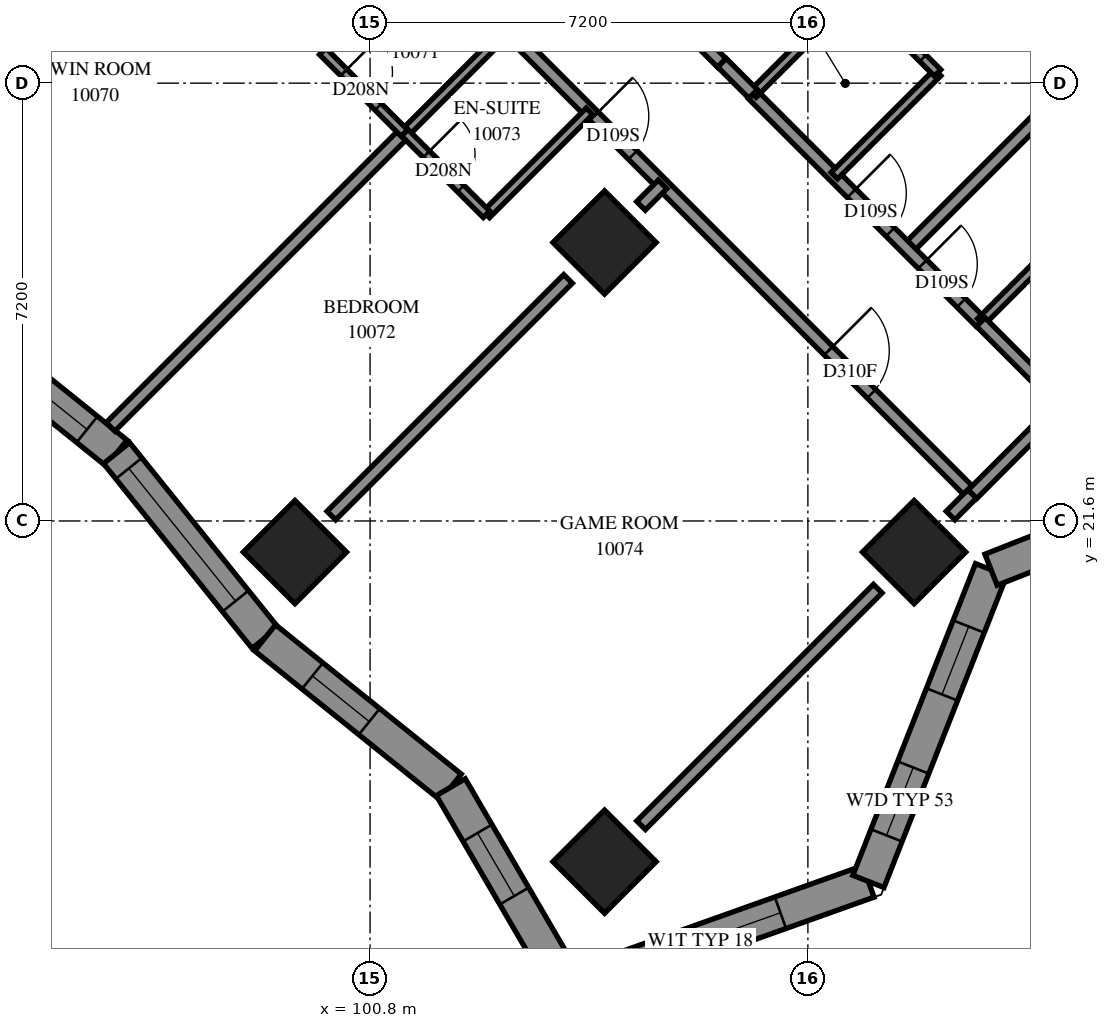
"""IFC4 building model, lengths in metres.
Left out: names, types, materials, properties, quantities, classifications, styles, units other than length and angle.
Written with IfcOpenShell. Run it as: python <this file> out.ifc"""

import sys

from ifc_helpers import new_model, si_unit, direction, frame, frame_2d, origin, origin_2d, place, context, subcontext, project, spatial, polyline, rectangle, outline, extrude, element, fill, save


model = new_model("IFC4")
c1 = context("Model", 3, precision=1e-05, world=origin(), true_north=direction((0.0, 1.0)))
c2 = subcontext(c1, "Body", "Model", "MODEL_VIEW")
j1 = project(units=[si_unit("LENGTHUNIT", "METRE"), si_unit("PLANEANGLEUNIT", "RADIAN")], contexts=[c1])
p1 = place(None, origin())
s1 = spatial("IfcSite", under=j1, at=p1, CompositionType="ELEMENT")
p2 = place(p1, origin())
s2 = spatial("IfcBuilding", under=s1, at=p2, CompositionType="ELEMENT")
p3 = place(p2, frame((0.0, 0.0, 40.6)))
s3 = spatial("IfcBuildingStorey", under=s2, at=p3, CompositionType="ELEMENT", Elevation=40.6)
for number, where, z_axis, x_axis in (
    (1, (104.656, 26.18, 0.0), (0.0, 0.0, 1.0), (0.707, -0.707, 0.0)),
    (2, (99.565, 21.088, 0.0), (0.0, 0.0, 1.0), (0.707, -0.707, 0.0)),
    (3, (109.747, 21.088, 0.0), (0.0, 0.0, 1.0), (0.707, -0.707, 0.0)),
    (4, (104.656, 15.997, 0.0), (0.0, 0.0, 1.0), (0.707, -0.707, 0.0)),
):
    element("IfcColumn", number, at=place(p3, frame(where, z_axis=z_axis, x_axis=x_axis)), inside=s3, PredefinedType="COLUMN", context=c2, shape_type="SweptSolid", body=[
        extrude(rectangle(XDim=1.2, YDim=1.2, at=origin_2d()), origin(), (0.0, 0.0, 1.0), 3.1),
    ])
p4 = place(p3, frame((104.056, 13.914, 0.0), z_axis=(0.0, 0.0, 1.0), x_axis=(0.942037149, 0.3355085839, 0.0)))
e5 = element("IfcWall", 5, at=p4, inside=s3, PredefinedType="SOLIDWALL", context=c2, shape_type="SweptSolid", body=[
    extrude(outline(polyline([(-0.228, -0.275), (5.368, -0.275), (5.118, 0.275), (0.228, 0.275), (-0.228, -0.275)])), origin(), (0.0, 0.0, 1.0), 3.1),
])
p5 = place(p4, frame((0.907, 0.0, 0.5)))
e6 = element("IfcOpeningElement", 6, at=p5, cuts=e5, PredefinedType="OPENING", context=c2, shape_type="SweptSolid", body=[
    extrude(rectangle(XDim=2.8, YDim=2.45, at=frame_2d((1.4, 1.225))), frame((0.0, 0.285, 0.0), z_axis=(0.0, -1.0, 0.0), x_axis=(1.0, 0.0, 0.0)), (0.0, 0.0, 1.0), 0.57),
])
p6 = place(p3, frame((108.995, 15.673, 0.0), z_axis=(0.0, 0.0, 1.0), x_axis=(0.3662073004, 0.930533295, 0.0)))
e7 = element("IfcWall", 7, at=p6, inside=s3, PredefinedType="SOLIDWALL", context=c2, shape_type="SweptSolid", body=[
    extrude(outline(polyline([(-0.125, -0.275), (5.388, -0.275), (5.628, 0.275), (0.125, 0.275), (-0.125, -0.275)])), origin(), (0.0, 0.0, 1.0), 3.1),
])
p7 = place(p6, frame((0.813, 0.0, 0.5)))
e8 = element("IfcOpeningElement", 8, at=p7, cuts=e7, PredefinedType="OPENING", context=c2, shape_type="SweptSolid", body=[
    extrude(rectangle(XDim=1.2, YDim=2.45, at=frame_2d((0.6, 1.225))), frame((0.0, 0.285, 0.0), z_axis=(0.0, -1.0, 0.0), x_axis=(1.0, 0.0, 0.0)), (0.0, 0.0, 1.0), 0.57),
])
p8 = place(p6, frame((3.304, 0.0, 0.5)))
e9 = element("IfcOpeningElement", 9, at=p8, cuts=e7, PredefinedType="OPENING", context=c2, shape_type="SweptSolid", body=[
    extrude(rectangle(XDim=1.2, YDim=2.45, at=frame_2d((0.6, 1.225))), frame((0.0, 0.285, 0.0), z_axis=(0.0, -1.0, 0.0), x_axis=(1.0, 0.0, 0.0)), (0.0, 0.0, 1.0), 0.57),
])
p9 = place(p3, frame((111.012, 20.798, 0.0), z_axis=(0.0, 0.0, 1.0), x_axis=(0.9305394819, 0.3661915791, 0.0)))
e10 = element("IfcWall", 10, at=p9, inside=s3, PredefinedType="SOLIDWALL", context=c2, shape_type="SweptSolid", body=[
    extrude(outline(polyline([(0.12, -0.275), (5.633, -0.275), (5.383, 0.275), (-0.12, 0.275), (0.12, -0.275)])), origin(), (0.0, 0.0, 1.0), 3.1),
])
p10 = place(p9, frame((1.166, 0.0, 0.5)))
e11 = element("IfcOpeningElement", 11, at=p10, cuts=e10, PredefinedType="OPENING", context=c2, shape_type="SweptSolid", body=[
    extrude(rectangle(XDim=2.8, YDim=2.45, at=frame_2d((1.4, 1.225))), frame((0.0, 0.285, 0.0), z_axis=(0.0, -1.0, 0.0), x_axis=(1.0, 0.0, 0.0)), (0.0, 0.0, 1.0), 0.57),
])
p11 = place(p3, frame((93.593, 25.158, 0.0), z_axis=(0.0, 0.0, 1.0), x_axis=(0.7793346456, -0.6266079397, 0.0)))
e12 = element("IfcWall", 12, at=p11, inside=s3, PredefinedType="SOLIDWALL", context=c2, shape_type="SweptSolid", body=[
    extrude(outline(polyline([(-0.03, -0.275), (3.868, -0.275), (3.928, 0.275), (0.03, 0.275), (-0.03, -0.275)])), origin(), (0.0, 0.0, 1.0), 3.1),
])
p12 = place(p11, frame((0.475, 0.0, 0.5)))
e13 = element("IfcOpeningElement", 13, at=p12, cuts=e12, PredefinedType="OPENING", context=c2, shape_type="SweptSolid", body=[
    extrude(rectangle(XDim=2.8, YDim=2.45, at=frame_2d((1.4, 1.225))), frame((0.0, 0.285, 0.0), z_axis=(0.0, -1.0, 0.0), x_axis=(1.0, 0.0, 0.0)), (0.0, 0.0, 1.0), 0.57),
])
p13 = place(p3, frame((96.631, 22.716, 0.0), z_axis=(0.0, 0.0, 1.0), x_axis=(0.6265954114, -0.7793447186, 0.0)))
e14 = element("IfcWall", 14, at=p13, inside=s3, PredefinedType="SOLIDWALL", context=c2, shape_type="SweptSolid", body=[
    extrude(outline(polyline([(0.03, -0.275), (3.928, -0.275), (3.868, 0.275), (-0.03, 0.275), (0.03, -0.275)])), origin(), (0.0, 0.0, 1.0), 3.1),
])
p14 = place(p13, frame((0.322, 0.0, 0.5)))
e15 = element("IfcOpeningElement", 15, at=p14, cuts=e14, PredefinedType="OPENING", context=c2, shape_type="SweptSolid", body=[
    extrude(rectangle(XDim=2.8, YDim=2.45, at=frame_2d((1.4, 1.225))), frame((0.0, 0.285, 0.0), z_axis=(0.0, -1.0, 0.0), x_axis=(1.0, 0.0, 0.0)), (0.0, 0.0, 1.0), 0.57),
])
p15 = place(p3, frame((99.073, 19.678, 0.0), z_axis=(0.0, 0.0, 1.0), x_axis=(0.7793429302, -0.6265976358, 0.0)))
e16 = element("IfcWall", 16, at=p15, inside=s3, PredefinedType="SOLIDWALL", context=c2, shape_type="SweptSolid", body=[
    extrude(outline(polyline([(-0.03, -0.275), (3.868, -0.275), (3.97, 0.275), (0.03, 0.275), (-0.03, -0.275)])), origin(), (0.0, 0.0, 1.0), 3.1),
])
p16 = place(p15, frame((0.999, 0.0, 0.5)))
e17 = element("IfcOpeningElement", 17, at=p16, cuts=e16, PredefinedType="OPENING", context=c2, shape_type="SweptSolid", body=[
    extrude(rectangle(XDim=1.2, YDim=2.45, at=frame_2d((0.6, 1.225))), frame((0.0, 0.285, 0.0), z_axis=(0.0, -1.0, 0.0), x_axis=(1.0, 0.0, 0.0)), (0.0, 0.0, 1.0), 0.57),
])
p17 = place(p3, frame((102.128, 17.223, 0.0), z_axis=(0.0, 0.0, 1.0), x_axis=(0.5036112548, -0.8639303815, 0.0)))
e18 = element("IfcWall", 18, at=p17, inside=s3, PredefinedType="SOLIDWALL", context=c2, shape_type="SweptSolid", body=[
    extrude(outline(polyline([(0.051, -0.275), (4.058, -0.275), (3.602, 0.275), (-0.051, 0.275), (0.051, -0.275)])), origin(), (0.0, 0.0, 1.0), 3.1),
])
p18 = place(p17, frame((0.872, 0.0, 0.5)))
e19 = element("IfcOpeningElement", 19, at=p18, cuts=e18, PredefinedType="OPENING", context=c2, shape_type="SweptSolid", body=[
    extrude(rectangle(XDim=1.2, YDim=2.45, at=frame_2d((0.6, 1.225))), frame((0.0, 0.285, 0.0), z_axis=(0.0, -1.0, 0.0), x_axis=(1.0, 0.0, 0.0)), (0.0, 0.0, 1.0), 0.57),
])
p19 = place(p3, frame((103.061, 29.677, 0.0), z_axis=(0.0, 0.0, 1.0), x_axis=(0.7071067812, -0.7071067812, 0.0)))
e20 = element("IfcWall", 20, at=p19, inside=s3, PredefinedType="PARTITIONING", context=c2, shape_type="SweptSolid", body=[
    extrude(rectangle(XDim=10.802, YDim=0.2, at=frame_2d((5.401, 0.0))), origin(), (0.0, 0.0, 1.0), 3.1),
])
p20 = place(p19, frame((2.012, 0.0, 0.0)))
e21 = element("IfcOpeningElement", 21, at=p20, cuts=e20, PredefinedType="OPENING", context=c2, shape_type="SweptSolid", body=[
    extrude(rectangle(XDim=0.9, YDim=2.1, at=frame_2d((0.45, 1.05))), frame((0.0, 0.11, 0.0), z_axis=(0.0, -1.0, 0.0), x_axis=(1.0, 0.0, 0.0)), (0.0, 0.0, 1.0), 0.22),
])
p21 = place(p19, frame((7.463, 0.0, 0.0)))
e22 = element("IfcOpeningElement", 22, at=p21, cuts=e20, PredefinedType="OPENING", context=c2, shape_type="SweptSolid", body=[
    extrude(rectangle(XDim=1.0, YDim=2.1, at=frame_2d((0.5, 1.05))), frame((0.0, 0.11, 0.0), z_axis=(0.0, -1.0, 0.0), x_axis=(1.0, 0.0, 0.0)), (0.0, 0.0, 1.0), 0.22),
])
p22 = place(p3, frame((96.532, 23.148, 0.0), z_axis=(0.0, 0.0, 1.0), x_axis=(0.7071140939, 0.7070994684, 0.0)))
e23 = element("IfcWall", 23, at=p22, inside=s3, PredefinedType="PARTITIONING", context=c2, shape_type="SweptSolid", body=[
    extrude(rectangle(XDim=6.837, YDim=0.2, at=frame_2d((3.419, 0.0))), origin(), (0.0, 0.0, 1.0), 3.1),
])
p23 = place(p3, frame((91.456, 28.255, 0.0), z_axis=(0.0, 0.0, 1.0), x_axis=(0.7071067812, 0.7071067812, 0.0)))
e24 = element("IfcWall", 24, at=p23, inside=s3, PredefinedType="PARTITIONING", context=c2, shape_type="SweptSolid", body=[
    extrude(rectangle(XDim=6.815, YDim=0.2, at=frame_2d((3.408, 0.0))), origin(), (0.0, 0.0, 1.0), 3.1),
])
p24 = place(p3, frame((109.64, 26.074, 0.0), z_axis=(0.0, 0.0, 1.0), x_axis=(0.7072538194, 0.7069597124, 0.0)))
e25 = element("IfcWall", 25, at=p24, inside=s3, PredefinedType="PARTITIONING", context=c2, shape_type="SweptSolid", body=[
    extrude(rectangle(XDim=6.8, YDim=0.2, at=frame_2d((3.4, 0.0))), origin(), (0.0, 0.0, 1.0), 3.1),
])
p25 = place(p3, frame((100.163, 21.689, 0.0), z_axis=(0.0, 0.0, 1.0), x_axis=(0.7071067812, 0.7071067812, 0.0)))
e26 = element("IfcWall", 26, at=p25, inside=s3, PredefinedType="PARTITIONING", context=c2, shape_type="SweptSolid", body=[
    extrude(rectangle(XDim=5.504, YDim=0.2, at=frame_2d((2.752, 0.0))), origin(), (0.0, 0.0, 1.0), 3.1),
])
p26 = place(p3, frame((105.257, 16.597, 0.0), z_axis=(0.0, 0.0, 1.0), x_axis=(0.7072884866, 0.706925029, 0.0)))
e27 = element("IfcWall", 27, at=p26, inside=s3, PredefinedType="PARTITIONING", context=c2, shape_type="SweptSolid", body=[
    extrude(rectangle(XDim=5.503, YDim=0.2, at=frame_2d((2.751, 0.0))), origin(), (0.0, 0.0, 1.0), 2.6),
])
p27 = place(p3, frame((107.093, 28.615, 0.0), z_axis=(0.0, 0.0, 1.0), x_axis=(0.7072011313, -0.7070124185, 0.0)))
e28 = element("IfcWall", 28, at=p27, inside=s3, PredefinedType="PARTITIONING", context=c2, shape_type="SweptSolid", body=[
    extrude(rectangle(XDim=5.299, YDim=0.2, at=frame_2d((2.65, 0.0))), origin(), (0.0, 0.0, 1.0), 3.1),
])
p28 = place(p27, frame((2.299, 0.0, 0.0)))
e29 = element("IfcOpeningElement", 29, at=p28, cuts=e28, PredefinedType="OPENING", context=c2, shape_type="SweptSolid", body=[
    extrude(rectangle(XDim=0.9, YDim=2.1, at=frame_2d((0.45, 1.05))), frame((0.0, 0.11, 0.0), z_axis=(0.0, -1.0, 0.0), x_axis=(1.0, 0.0, 0.0)), (0.0, 0.0, 1.0), 0.22),
])
p29 = place(p27, frame((3.949, 0.0, 0.0)))
e30 = element("IfcOpeningElement", 30, at=p29, cuts=e28, PredefinedType="OPENING", context=c2, shape_type="SweptSolid", body=[
    extrude(rectangle(XDim=0.9, YDim=2.1, at=frame_2d((0.45, 1.05))), frame((0.0, 0.11, 0.0), z_axis=(0.0, -1.0, 0.0), x_axis=(1.0, 0.0, 0.0)), (0.0, 0.0, 1.0), 0.22),
])
p30 = place(p3, frame((104.551, 31.165, 0.0), z_axis=(0.0, 0.0, 1.0), x_axis=(0.7074545101, -0.7067588812, 0.0)))
e31 = element("IfcWall", 31, at=p30, inside=s3, PredefinedType="PARTITIONING", context=c2, shape_type="SweptSolid", body=[
    extrude(rectangle(XDim=2.875, YDim=0.2, at=frame_2d((1.438, 0.0))), origin(), (0.0, 0.0, 1.0), 3.1),
])
p31 = place(p30, frame((0.148, 0.0, 0.0)))
e32 = element("IfcOpeningElement", 32, at=p31, cuts=e31, PredefinedType="OPENING", context=c2, shape_type="SweptSolid", body=[
    extrude(rectangle(XDim=0.9, YDim=2.1, at=frame_2d((0.45, 1.05))), frame((0.0, 0.11, 0.0), z_axis=(0.0, -1.0, 0.0), x_axis=(1.0, 0.0, 0.0)), (0.0, 0.0, 1.0), 0.22),
])
p32 = place(p3, frame((100.023, 29.327, 0.0), z_axis=(0.0, 0.0, 1.0), x_axis=(0.7071067812, 0.7071067812, 0.0)))
e33 = element("IfcWall", 33, at=p32, inside=s3, PredefinedType="PARTITIONING", context=c2, shape_type="SweptSolid", body=[
    extrude(rectangle(XDim=2.401, YDim=0.15, at=frame_2d((1.201, 0.0))), origin(), (0.0, 0.0, 1.0), 3.1),
])
for number, where, z_axis, x_axis in (
    (34, (101.371, 27.979, 0.0), (0.0, 0.0, 1.0), (0.707, 0.708, 0.0)),
    (35, (108.435, 27.279, 0.0), (0.0, 0.0, 1.0), (0.708, 0.707, 0.0)),
):
    element("IfcWall", number, at=place(p3, frame(where, z_axis=z_axis, x_axis=x_axis)), inside=s3, PredefinedType="PARTITIONING", context=c2, shape_type="SweptSolid", body=[
        extrude(rectangle(XDim=2.4, YDim=0.15, at=frame_2d((1.2, 0.0))), origin(), (0.0, 0.0, 1.0), 3.1),
    ])
for number, where, z_axis, x_axis in (
    (36, (102.711, 26.641, 0.0), (0.0, 0.0, 1.0), (0.707, 0.707, 0.0)),
    (37, (107.095, 28.621, 0.0), (0.0, 0.0, 1.0), (0.707, 0.707, 0.0)),
    (38, (110.843, 24.873, 0.0), (0.0, 0.0, 1.0), (0.707, 0.707, 0.0)),
):
    element("IfcWall", number, at=place(p3, frame(where, z_axis=z_axis, x_axis=x_axis)), inside=s3, PredefinedType="PARTITIONING", context=c2, shape_type="SweptSolid", body=[
        extrude(rectangle(XDim=2.398, YDim=0.15, at=frame_2d((1.199, 0.0))), origin(), (0.0, 0.0, 1.0), 3.1),
    ])
p33 = place(p3, frame((110.705, 22.039, 0.0), z_axis=(0.0, 0.0, 1.0), x_axis=(0.7066304548, 0.7075827869, 0.0)))
e39 = element("IfcWall", 39, at=p33, inside=s3, PredefinedType="PARTITIONING", context=c2, shape_type="SweptSolid", body=[
    extrude(rectangle(XDim=2.1, YDim=0.2, at=frame_2d((1.05, 0.0))), origin(), (0.0, 0.0, 1.0), 2.6),
])
p34 = place(p3, frame((100.021, 29.323, 0.0), z_axis=(0.0, 0.0, 1.0), x_axis=(0.7071067812, -0.7071067812, 0.0)))
e40 = element("IfcWall", 40, at=p34, inside=s3, PredefinedType="PARTITIONING", context=c2, shape_type="SweptSolid", body=[
    extrude(rectangle(XDim=1.901, YDim=0.15, at=frame_2d((0.95, 0.0))), origin(), (0.0, 0.0, 1.0), 3.1),
])
p35 = place(p34, frame((0.491, 0.0, 0.0)))
e41 = element("IfcOpeningElement", 41, at=p35, cuts=e40, PredefinedType="OPENING", context=c2, shape_type="SweptSolid", body=[
    extrude(rectangle(XDim=0.8, YDim=2.1, at=frame_2d((0.4, 1.05))), frame((0.0, 0.085, 0.0), z_axis=(0.0, -1.0, 0.0), x_axis=(1.0, 0.0, 0.0)), (0.0, 0.0, 1.0), 0.17),
])
p36 = place(p3, frame((108.789, 30.313, 0.0), z_axis=(0.0, 0.0, 1.0), x_axis=(0.7071067812, -0.7071067812, 0.0)))
e42 = element("IfcWall", 42, at=p36, inside=s3, PredefinedType="PARTITIONING", context=c2, shape_type="SweptSolid", body=[
    extrude(rectangle(XDim=1.901, YDim=0.15, at=frame_2d((0.95, 0.0))), origin(), (0.0, 0.0, 1.0), 3.1),
])
p37 = place(p36, frame((0.76, 0.0, 0.0)))
e43 = element("IfcOpeningElement", 43, at=p37, cuts=e42, PredefinedType="OPENING", context=c2, shape_type="SweptSolid", body=[
    extrude(rectangle(XDim=0.8, YDim=2.1, at=frame_2d((0.4, 1.05))), frame((0.0, 0.085, 0.0), z_axis=(0.0, -1.0, 0.0), x_axis=(1.0, 0.0, 0.0)), (0.0, 0.0, 1.0), 0.17),
])
p38 = place(p3, frame((110.843, 24.871, 0.0), z_axis=(0.0, 0.0, 1.0), x_axis=(0.7065800724, -0.7076330979, 0.0)))
e44 = element("IfcWall", 44, at=p38, inside=s3, PredefinedType="PARTITIONING", context=c2, shape_type="SweptSolid", body=[
    extrude(rectangle(XDim=1.899, YDim=0.2, at=frame_2d((0.95, 0.0))), origin(), (0.0, 0.0, 1.0), 3.1),
])
p39 = place(p3, frame((101.371, 27.985, 0.0), z_axis=(0.0, 0.0, 1.0), x_axis=(0.7076330979, -0.7065800724, 0.0)))
e45 = element("IfcWall", 45, at=p39, inside=s3, PredefinedType="PARTITIONING", context=c2, shape_type="SweptSolid", body=[
    extrude(rectangle(XDim=1.899, YDim=0.15, at=frame_2d((0.95, 0.0))), origin(), (0.0, 0.0, 1.0), 3.1),
])
p40 = place(p39, frame((0.501, 0.0, 0.0)))
e46 = element("IfcOpeningElement", 46, at=p40, cuts=e45, PredefinedType="OPENING", context=c2, shape_type="SweptSolid", body=[
    extrude(rectangle(XDim=0.8, YDim=2.1, at=frame_2d((0.4, 1.05))), frame((0.0, 0.085, 0.0), z_axis=(0.0, -1.0, 0.0), x_axis=(1.0, 0.0, 0.0)), (0.0, 0.0, 1.0), 0.17),
])
p41 = place(p3, frame((106.587, 29.135, 0.0), z_axis=(0.0, 0.0, 1.0), x_axis=(0.7071067812, -0.7071067812, 0.0)))
e47 = element("IfcWall", 47, at=p41, inside=s3, PredefinedType="PARTITIONING", context=c2, shape_type="SweptSolid", body=[
    extrude(rectangle(XDim=0.724, YDim=0.2, at=frame_2d((0.362, 0.0))), origin(), (0.0, 0.0, 1.0), 3.1),
])
p42 = place(p3, frame((105.255, 26.781, 0.0), z_axis=(0.0, 0.0, 1.0), x_axis=(0.7071067812, 0.7071067812, 0.0)))
e48 = element("IfcWall", 48, at=p42, inside=s3, PredefinedType="PARTITIONING", context=c2, shape_type="SweptSolid", body=[
    extrude(rectangle(XDim=0.501, YDim=0.2, at=frame_2d((0.25, 0.0))), origin(), (0.0, 0.0, 1.0), 3.1),
])
p43 = place(p3, frame((110.347, 21.689, 0.0), z_axis=(0.0, 0.0, 1.0), x_axis=(0.7071067812, 0.7071067812, 0.0)))
e49 = element("IfcWall", 49, at=p43, inside=s3, PredefinedType="PARTITIONING", context=c2, shape_type="SweptSolid", body=[
    extrude(rectangle(XDim=0.501, YDim=0.2, at=frame_2d((0.25, 0.0))), origin(), (0.0, 0.0, 1.0), 2.6),
])
p44 = place(p5, origin())
e50 = element("IfcWindow", 50, at=p44, inside=s3, PartitioningType="SINGLE_PANEL", PredefinedType="WINDOW", context=c2, shape_type="SweptSolid", body=[
    extrude(rectangle(XDim=2.8, YDim=2.45, at=frame_2d((1.4, 1.225))), frame((0.0, 0.155, 0.0), z_axis=(0.0, -1.0, 0.0), x_axis=(1.0, 0.0, 0.0)), (0.0, 0.0, 1.0), 0.06),
])
fill(e6, e50)
p45 = place(p7, origin())
e51 = element("IfcWindow", 51, at=p45, inside=s3, PartitioningType="SINGLE_PANEL", PredefinedType="WINDOW", context=c2, shape_type="SweptSolid", body=[
    extrude(rectangle(XDim=1.2, YDim=2.45, at=frame_2d((0.6, 1.225))), frame((0.0, 0.155, 0.0), z_axis=(0.0, -1.0, 0.0), x_axis=(1.0, 0.0, 0.0)), (0.0, 0.0, 1.0), 0.06),
])
fill(e8, e51)
p46 = place(p8, origin())
e52 = element("IfcWindow", 52, at=p46, inside=s3, PartitioningType="SINGLE_PANEL", PredefinedType="WINDOW", context=c2, shape_type="SweptSolid", body=[
    extrude(rectangle(XDim=1.2, YDim=2.45, at=frame_2d((0.6, 1.225))), frame((0.0, 0.155, 0.0), z_axis=(0.0, -1.0, 0.0), x_axis=(1.0, 0.0, 0.0)), (0.0, 0.0, 1.0), 0.06),
])
fill(e9, e52)
p47 = place(p12, origin())
e53 = element("IfcWindow", 53, at=p47, inside=s3, PartitioningType="SINGLE_PANEL", PredefinedType="WINDOW", context=c2, shape_type="SweptSolid", body=[
    extrude(rectangle(XDim=2.8, YDim=2.45, at=frame_2d((1.4, 1.225))), frame((0.0, 0.155, 0.0), z_axis=(0.0, -1.0, 0.0), x_axis=(1.0, 0.0, 0.0)), (0.0, 0.0, 1.0), 0.06),
])
fill(e13, e53)
p48 = place(p14, origin())
e54 = element("IfcWindow", 54, at=p48, inside=s3, PartitioningType="SINGLE_PANEL", PredefinedType="WINDOW", context=c2, shape_type="SweptSolid", body=[
    extrude(rectangle(XDim=2.8, YDim=2.45, at=frame_2d((1.4, 1.225))), frame((0.0, 0.155, 0.0), z_axis=(0.0, -1.0, 0.0), x_axis=(1.0, 0.0, 0.0)), (0.0, 0.0, 1.0), 0.06),
])
fill(e15, e54)
p49 = place(p16, origin())
e55 = element("IfcWindow", 55, at=p49, inside=s3, PartitioningType="SINGLE_PANEL", PredefinedType="WINDOW", context=c2, shape_type="SweptSolid", body=[
    extrude(rectangle(XDim=1.2, YDim=2.45, at=frame_2d((0.6, 1.225))), frame((0.0, 0.155, 0.0), z_axis=(0.0, -1.0, 0.0), x_axis=(1.0, 0.0, 0.0)), (0.0, 0.0, 1.0), 0.06),
])
fill(e17, e55)
p50 = place(p18, origin())
e56 = element("IfcWindow", 56, at=p50, inside=s3, PartitioningType="SINGLE_PANEL", PredefinedType="WINDOW", context=c2, shape_type="SweptSolid", body=[
    extrude(rectangle(XDim=1.2, YDim=2.45, at=frame_2d((0.6, 1.225))), frame((0.0, 0.155, 0.0), z_axis=(0.0, -1.0, 0.0), x_axis=(1.0, 0.0, 0.0)), (0.0, 0.0, 1.0), 0.06),
])
fill(e19, e56)
p51 = place(p28, origin())
e57 = element("IfcDoor", 57, at=p51, inside=s3, OperationType="SINGLE_SWING_LEFT", PredefinedType="DOOR", context=c2, shape_type="SweptSolid", body=[
    extrude(rectangle(XDim=0.9, YDim=2.1, at=frame_2d((0.45, 1.05))), frame((0.0, 0.025, 0.0), z_axis=(0.0, -1.0, 0.0), x_axis=(1.0, 0.0, 0.0)), (0.0, 0.0, 1.0), 0.05),
])
fill(e29, e57)
p52 = place(p37, origin())
e58 = element("IfcDoor", 58, at=p52, inside=s3, OperationType="SINGLE_SWING_RIGHT", PredefinedType="DOOR", context=c2, shape_type="SweptSolid", body=[
    extrude(rectangle(XDim=0.8, YDim=2.1, at=frame_2d((0.4, 1.05))), frame((0.0, 0.025, 0.0), z_axis=(0.0, -1.0, 0.0), x_axis=(1.0, 0.0, 0.0)), (0.0, 0.0, 1.0), 0.05),
])
fill(e43, e58)
p53 = place(p35, origin())
e59 = element("IfcDoor", 59, at=p53, inside=s3, OperationType="SINGLE_SWING_RIGHT", PredefinedType="DOOR", context=c2, shape_type="SweptSolid", body=[
    extrude(rectangle(XDim=0.8, YDim=2.1, at=frame_2d((0.4, 1.05))), frame((0.0, 0.025, 0.0), z_axis=(0.0, -1.0, 0.0), x_axis=(1.0, 0.0, 0.0)), (0.0, 0.0, 1.0), 0.05),
])
fill(e41, e59)
p54 = place(p20, origin())
e60 = element("IfcDoor", 60, at=p54, inside=s3, OperationType="SINGLE_SWING_LEFT", PredefinedType="DOOR", context=c2, shape_type="SweptSolid", body=[
    extrude(rectangle(XDim=0.9, YDim=2.1, at=frame_2d((0.45, 1.05))), frame((0.0, 0.025, 0.0), z_axis=(0.0, -1.0, 0.0), x_axis=(1.0, 0.0, 0.0)), (0.0, 0.0, 1.0), 0.05),
])
fill(e21, e60)
p55 = place(p40, origin())
e61 = element("IfcDoor", 61, at=p55, inside=s3, OperationType="SINGLE_SWING_RIGHT", PredefinedType="DOOR", context=c2, shape_type="SweptSolid", body=[
    extrude(rectangle(XDim=0.8, YDim=2.1, at=frame_2d((0.4, 1.05))), frame((0.0, 0.025, 0.0), z_axis=(0.0, -1.0, 0.0), x_axis=(1.0, 0.0, 0.0)), (0.0, 0.0, 1.0), 0.05),
])
fill(e46, e61)
p56 = place(p21, origin())
e62 = element("IfcDoor", 62, at=p56, inside=s3, OperationType="SINGLE_SWING_RIGHT", PredefinedType="DOOR", context=c2, shape_type="SweptSolid", body=[
    extrude(rectangle(XDim=1.0, YDim=2.1, at=frame_2d((0.5, 1.05))), frame((0.0, 0.025, 0.0), z_axis=(0.0, -1.0, 0.0), x_axis=(1.0, 0.0, 0.0)), (0.0, 0.0, 1.0), 0.05),
])
fill(e22, e62)
p57 = place(p29, origin())
e63 = element("IfcDoor", 63, at=p57, inside=s3, OperationType="SINGLE_SWING_RIGHT", PredefinedType="DOOR", context=c2, shape_type="SweptSolid", body=[
    extrude(rectangle(XDim=0.9, YDim=2.1, at=frame_2d((0.45, 1.05))), frame((0.0, 0.025, 0.0), z_axis=(0.0, -1.0, 0.0), x_axis=(1.0, 0.0, 0.0)), (0.0, 0.0, 1.0), 0.05),
])
fill(e30, e63)
save(model, sys.argv[1])
